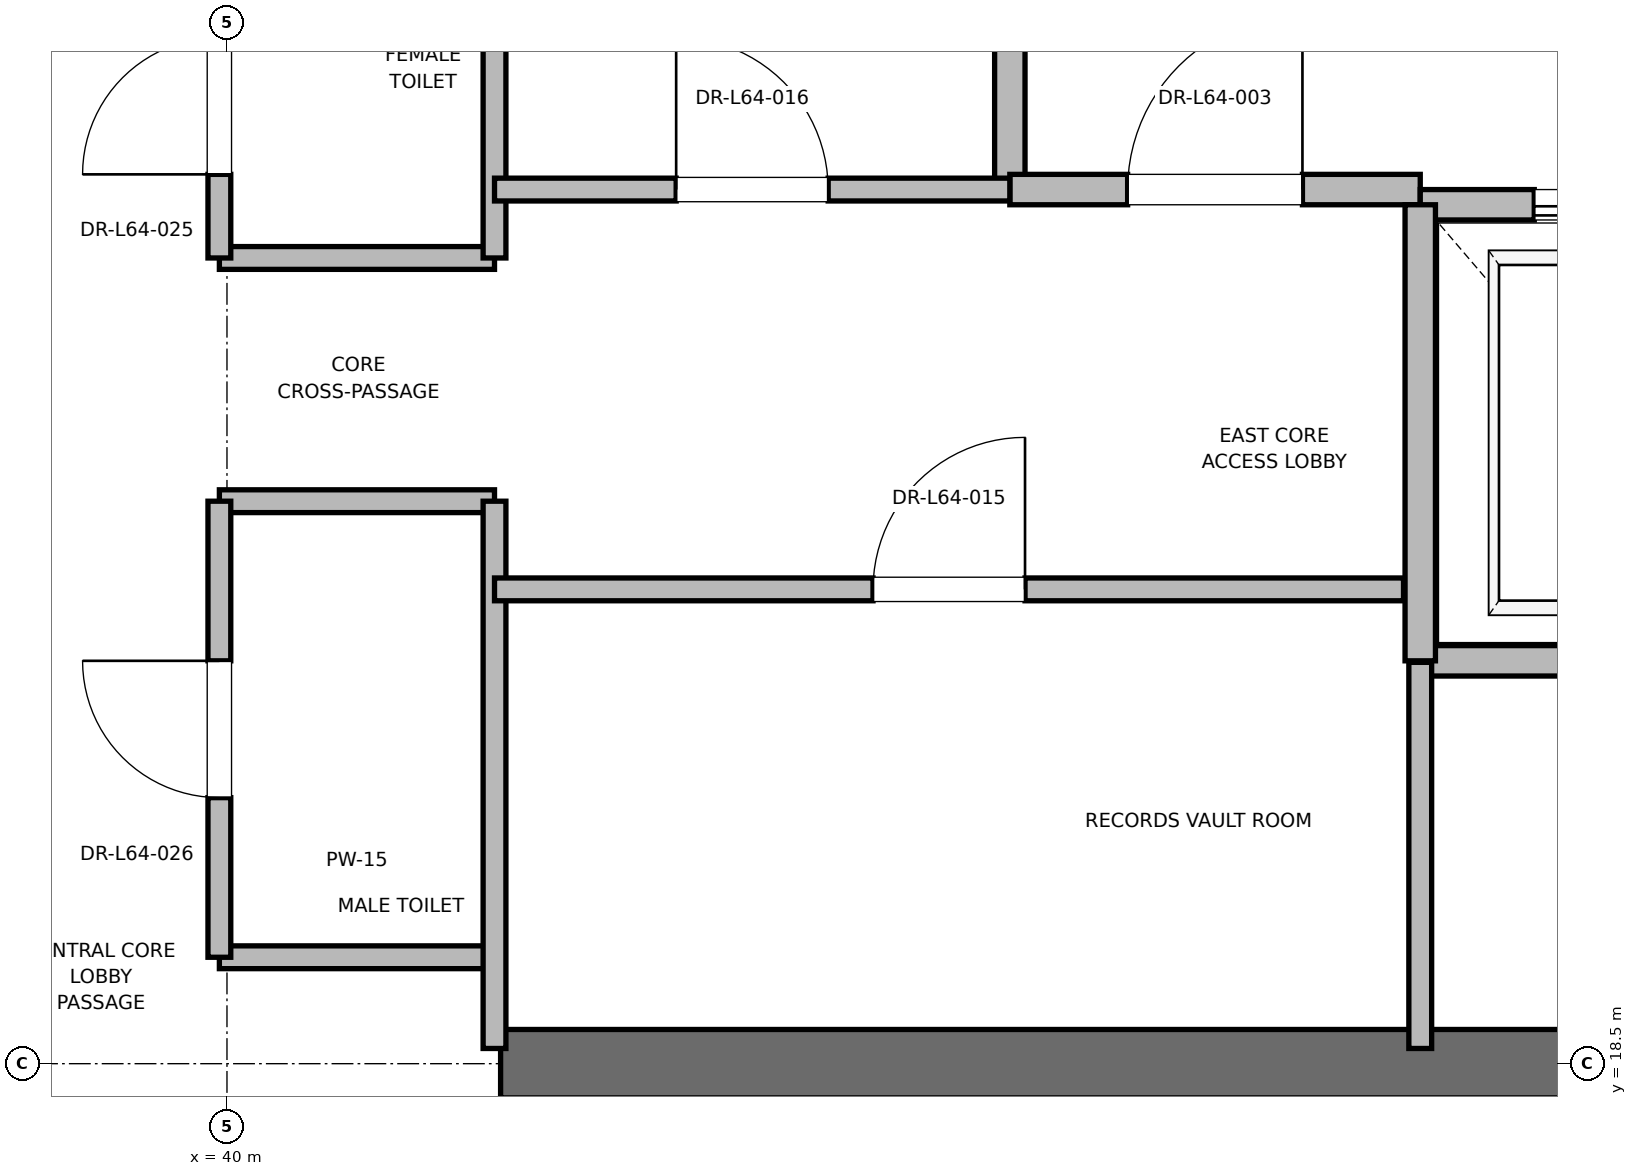
"""IFC4 building model, lengths in metres.
Left out: names, types, materials, properties, quantities, classifications, styles, units other than length and angle.
Written with IfcOpenShell. Run it as: python <this file> out.ifc"""

import sys

from ifc_helpers import new_model, si_unit, direction, frame, frame_2d, origin, place, context, subcontext, project, spatial, rectangle, extrude, element, fill, save


model = new_model("IFC4")
c1 = context("Model", 3, precision=1e-05, world=origin(), true_north=direction((0.0, 1.0)))
c2 = subcontext(c1, "Body", "Model", "MODEL_VIEW")
j1 = project(units=[si_unit("LENGTHUNIT", "METRE"), si_unit("PLANEANGLEUNIT", "RADIAN")], contexts=[c1])
p1 = place(None, origin())
s1 = spatial("IfcSite", under=j1, at=p1, CompositionType="ELEMENT")
p2 = place(p1, origin())
s2 = spatial("IfcBuilding", under=s1, at=p2, CompositionType="ELEMENT")
p3 = place(p2, frame((0.0, 0.0, 275.2)))
s3 = spatial("IfcBuildingStorey", under=s2, at=p3, CompositionType="ELEMENT", Elevation=275.2)
p4 = place(p3, frame((41.8, 18.5, 0.0), z_axis=(0.0, 0.0, 1.0), x_axis=(1.0, 0.0, 0.0)))
e1 = element("IfcWall", 1, at=p4, inside=s3, PredefinedType="SHEAR", context=c2, shape_type="SweptSolid", body=[
    extrude(rectangle(XDim=9.2, YDim=0.45, at=frame_2d((4.6, 0.0))), origin(), (0.0, 0.0, 1.0), 3.785),
])
p5 = place(p3, frame((45.15, 24.25, 0.0), z_axis=(0.0, 0.0, 1.0), x_axis=(0.0, 1.0, 0.0)))
e2 = element("IfcWall", 2, at=p5, inside=s3, PredefinedType="PARTITIONING", context=c2, shape_type="SweptSolid", body=[
    extrude(rectangle(XDim=3.37, YDim=0.2, at=frame_2d((1.685, 0.0))), origin(), (0.0, 0.0, 1.0), 3.785),
])
p6 = place(p3, frame((45.15, 24.25, 0.0), z_axis=(0.0, 0.0, 1.0), x_axis=(1.0, 0.0, 0.0)))
e3 = element("IfcWall", 3, at=p6, inside=s3, PredefinedType="PARTITIONING", context=c2, shape_type="SweptSolid", body=[
    extrude(rectangle(XDim=2.7, YDim=0.2, at=frame_2d((1.35, 0.0))), origin(), (0.0, 0.0, 1.0), 3.785),
])
p7 = place(p6, frame((0.775, 0.0, 0.0)))
e4 = element("IfcOpeningElement", 4, at=p7, cuts=e3, PredefinedType="OPENING", context=c2, shape_type="SweptSolid", body=[
    extrude(rectangle(XDim=1.15, YDim=2.2, at=frame_2d((0.575, 1.1))), frame((0.0, 0.1, 0.0), z_axis=(0.0, -1.0, 0.0), x_axis=(1.0, 0.0, 0.0)), (0.0, 0.0, 1.0), 0.2),
])
p8 = place(p3, frame((47.85, 21.15, 0.0), z_axis=(0.0, 0.0, 1.0), x_axis=(1.0, 0.0, 0.0)))
e5 = element("IfcWall", 5, at=p8, inside=s3, PredefinedType="SOLIDWALL", context=c2, shape_type="SweptSolid", body=[
    extrude(rectangle(XDim=2.6, YDim=0.2, at=frame_2d((1.3, 0.0))), origin(), (0.0, 0.0, 1.0), 3.785),
])
p9 = place(p3, frame((50.45, 24.15, 0.0), z_axis=(0.0, 0.0, 1.0), x_axis=(-1.0, 0.0, 0.0)))
e6 = element("IfcWall", 6, at=p9, inside=s3, PredefinedType="SOLIDWALL", context=c2, shape_type="SweptSolid", body=[
    extrude(rectangle(XDim=2.6, YDim=0.2, at=frame_2d((1.3, 0.0))), origin(), (0.0, 0.0, 1.0), 2.865),
])
p10 = place(p9, frame((0.75, 0.0, 0.0)))
e7 = element("IfcOpeningElement", 7, at=p10, cuts=e6, PredefinedType="OPENING", context=c2, shape_type="SweptSolid", body=[
    extrude(rectangle(XDim=1.1, YDim=2.2, at=frame_2d((0.55, 1.1))), frame((0.0, 0.1, 0.0), z_axis=(0.0, -1.0, 0.0), x_axis=(1.0, 0.0, 0.0)), (0.0, 0.0, 1.0), 0.2),
])
p11 = place(p3, frame((47.85, 24.15, 0.0), z_axis=(0.0, 0.0, 1.0), x_axis=(0.0, -1.0, 0.0)))
e8 = element("IfcWall", 8, at=p11, inside=s3, PredefinedType="SOLIDWALL", context=c2, shape_type="SweptSolid", body=[
    extrude(rectangle(XDim=3.0, YDim=0.2, at=frame_2d((1.5, 0.0))), origin(), (0.0, 0.0, 1.0), 3.785),
])
for number, where, z_axis, x_axis in (
    (9, (39.95, 19.2, 0.0), (0.0, 0.0, 1.0), (1.0, 0.0, 0.0)),
    (10, (39.95, 22.2, 0.0), (0.0, 0.0, 1.0), (1.0, 0.0, 0.0)),
    (11, (39.95, 23.8, 0.0), (0.0, 0.0, 1.0), (1.0, 0.0, 0.0)),
):
    element("IfcWall", number, at=place(p3, frame(where, z_axis=z_axis, x_axis=x_axis)), inside=s3, PredefinedType="PARTITIONING", context=c2, shape_type="SweptSolid", body=[
        extrude(rectangle(XDim=1.81, YDim=0.15, at=frame_2d((0.905, 0.0))), origin(), (0.0, 0.0, 1.0), 2.85),
    ])
p12 = place(p3, frame((41.76, 18.6, 0.0), z_axis=(0.0, 0.0, 1.0), x_axis=(0.0, 1.0, 0.0)))
e12 = element("IfcWall", 12, at=p12, inside=s3, PredefinedType="PARTITIONING", context=c2, shape_type="SweptSolid", body=[
    extrude(rectangle(XDim=3.6, YDim=0.15, at=frame_2d((1.8, 0.0))), origin(), (0.0, 0.0, 1.0), 2.85),
])
p13 = place(p3, frame((41.76, 23.8, 0.0), z_axis=(0.0, 0.0, 1.0), x_axis=(0.0, 1.0, 0.0)))
e13 = element("IfcWall", 13, at=p13, inside=s3, PredefinedType="PARTITIONING", context=c2, shape_type="SweptSolid", body=[
    extrude(rectangle(XDim=4.0, YDim=0.15, at=frame_2d((2.0, 0.0))), origin(), (0.0, 0.0, 1.0), 2.85),
])
p14 = place(p3, frame((39.95, 19.2, 0.0), z_axis=(0.0, 0.0, 1.0), x_axis=(0.0, 1.0, 0.0)))
e14 = element("IfcWall", 14, at=p14, inside=s3, PredefinedType="PARTITIONING", context=c2, shape_type="SweptSolid", body=[
    extrude(rectangle(XDim=3.0, YDim=0.15, at=frame_2d((1.5, 0.0))), origin(), (0.0, 0.0, 1.0), 2.85),
])
p15 = place(p14, frame((1.05, 0.0, 0.0)))
e15 = element("IfcOpeningElement", 15, at=p15, cuts=e14, PredefinedType="OPENING", context=c2, shape_type="SweptSolid", body=[
    extrude(rectangle(XDim=0.9, YDim=2.1, at=frame_2d((0.45, 1.05))), frame((0.0, 0.075, 0.0), z_axis=(0.0, -1.0, 0.0), x_axis=(1.0, 0.0, 0.0)), (0.0, 0.0, 1.0), 0.15),
])
p16 = place(p3, frame((39.95, 23.8, 0.0), z_axis=(0.0, 0.0, 1.0), x_axis=(0.0, 1.0, 0.0)))
e16 = element("IfcWall", 16, at=p16, inside=s3, PredefinedType="PARTITIONING", context=c2, shape_type="SweptSolid", body=[
    extrude(rectangle(XDim=2.0, YDim=0.15, at=frame_2d((1.0, 0.0))), origin(), (0.0, 0.0, 1.0), 2.85),
])
p17 = place(p16, frame((0.55, 0.0, 0.0)))
e17 = element("IfcOpeningElement", 17, at=p17, cuts=e16, PredefinedType="OPENING", context=c2, shape_type="SweptSolid", body=[
    extrude(rectangle(XDim=0.9, YDim=2.1, at=frame_2d((0.45, 1.05))), frame((0.0, 0.075, 0.0), z_axis=(0.0, -1.0, 0.0), x_axis=(1.0, 0.0, 0.0)), (0.0, 0.0, 1.0), 0.15),
])
p18 = place(p3, frame((47.85, 18.6, 0.0), z_axis=(0.0, 0.0, 1.0), x_axis=(0.0, 1.0, 0.0)))
e18 = element("IfcWall", 18, at=p18, inside=s3, PredefinedType="PARTITIONING", context=c2, shape_type="SweptSolid", body=[
    extrude(rectangle(XDim=2.54, YDim=0.15, at=frame_2d((1.27, 0.0))), origin(), (0.0, 0.0, 1.0), 2.85),
])
p19 = place(p3, frame((41.76, 21.62, 0.0), z_axis=(0.0, 0.0, 1.0), x_axis=(1.0, 0.0, 0.0)))
e19 = element("IfcWall", 19, at=p19, inside=s3, PredefinedType="PARTITIONING", context=c2, shape_type="SweptSolid", body=[
    extrude(rectangle(XDim=5.98, YDim=0.15, at=frame_2d((2.99, 0.0))), origin(), (0.0, 0.0, 1.0), 2.85),
])
p20 = place(p19, frame((2.49, 0.0, 0.0)))
e20 = element("IfcOpeningElement", 20, at=p20, cuts=e19, PredefinedType="OPENING", context=c2, shape_type="SweptSolid", body=[
    extrude(rectangle(XDim=1.0, YDim=2.15, at=frame_2d((0.5, 1.075))), frame((0.0, 0.075, 0.0), z_axis=(0.0, -1.0, 0.0), x_axis=(1.0, 0.0, 0.0)), (0.0, 0.0, 1.0), 0.15),
])
p21 = place(p3, frame((41.76, 24.25, 0.0), z_axis=(0.0, 0.0, 1.0), x_axis=(1.0, 0.0, 0.0)))
e21 = element("IfcWall", 21, at=p21, inside=s3, PredefinedType="PARTITIONING", context=c2, shape_type="SweptSolid", body=[
    extrude(rectangle(XDim=3.39, YDim=0.15, at=frame_2d((1.695, 0.0))), origin(), (0.0, 0.0, 1.0), 2.85),
])
p22 = place(p21, frame((1.195, 0.0, 0.0)))
e22 = element("IfcOpeningElement", 22, at=p22, cuts=e21, PredefinedType="OPENING", context=c2, shape_type="SweptSolid", body=[
    extrude(rectangle(XDim=1.0, YDim=2.15, at=frame_2d((0.5, 1.075))), frame((0.0, 0.075, 0.0), z_axis=(0.0, -1.0, 0.0), x_axis=(1.0, 0.0, 0.0)), (0.0, 0.0, 1.0), 0.15),
])
p23 = place(p7, origin())
e23 = element("IfcDoor", 23, at=p23, inside=s3, OperationType="SINGLE_SWING_RIGHT", PredefinedType="DOOR", context=c2, shape_type="SweptSolid", body=[
    extrude(rectangle(XDim=1.15, YDim=2.2, at=frame_2d((0.575, 1.1))), frame((0.0, 0.025, 0.0), z_axis=(0.0, -1.0, 0.0), x_axis=(1.0, 0.0, 0.0)), (0.0, 0.0, 1.0), 0.05),
])
fill(e4, e23)
p24 = place(p10, origin())
e24 = element("IfcDoor", 24, at=p24, inside=s3, OperationType="SLIDING_TO_RIGHT", PredefinedType="DOOR", context=c2, shape_type="SweptSolid", body=[
    extrude(rectangle(XDim=1.1, YDim=2.2, at=frame_2d((0.55, 1.1))), frame((0.0, 0.025, 0.0), z_axis=(0.0, -1.0, 0.0), x_axis=(1.0, 0.0, 0.0)), (0.0, 0.0, 1.0), 0.05),
])
fill(e7, e24)
p25 = place(p15, origin())
e25 = element("IfcDoor", 25, at=p25, inside=s3, OperationType="SINGLE_SWING_RIGHT", PredefinedType="DOOR", context=c2, shape_type="SweptSolid", body=[
    extrude(rectangle(XDim=0.9, YDim=2.1, at=frame_2d((0.45, 1.05))), frame((0.0, 0.025, 0.0), z_axis=(0.0, -1.0, 0.0), x_axis=(1.0, 0.0, 0.0)), (0.0, 0.0, 1.0), 0.05),
])
fill(e15, e25)
p26 = place(p17, origin())
e26 = element("IfcDoor", 26, at=p26, inside=s3, OperationType="SINGLE_SWING_LEFT", PredefinedType="DOOR", context=c2, shape_type="SweptSolid", body=[
    extrude(rectangle(XDim=0.9, YDim=2.1, at=frame_2d((0.45, 1.05))), frame((0.0, 0.025, 0.0), z_axis=(0.0, -1.0, 0.0), x_axis=(1.0, 0.0, 0.0)), (0.0, 0.0, 1.0), 0.05),
])
fill(e17, e26)
p27 = place(p20, origin())
e27 = element("IfcDoor", 27, at=p27, inside=s3, OperationType="SINGLE_SWING_RIGHT", PredefinedType="DOOR", context=c2, shape_type="SweptSolid", body=[
    extrude(rectangle(XDim=1.0, YDim=2.15, at=frame_2d((0.5, 1.075))), frame((0.0, 0.025, 0.0), z_axis=(0.0, -1.0, 0.0), x_axis=(1.0, 0.0, 0.0)), (0.0, 0.0, 1.0), 0.05),
])
fill(e20, e27)
p28 = place(p22, origin())
e28 = element("IfcDoor", 28, at=p28, inside=s3, OperationType="SINGLE_SWING_LEFT", PredefinedType="DOOR", context=c2, shape_type="SweptSolid", body=[
    extrude(rectangle(XDim=1.0, YDim=2.15, at=frame_2d((0.5, 1.075))), frame((0.0, 0.025, 0.0), z_axis=(0.0, -1.0, 0.0), x_axis=(1.0, 0.0, 0.0)), (0.0, 0.0, 1.0), 0.05),
])
fill(e22, e28)
save(model, sys.argv[1])
